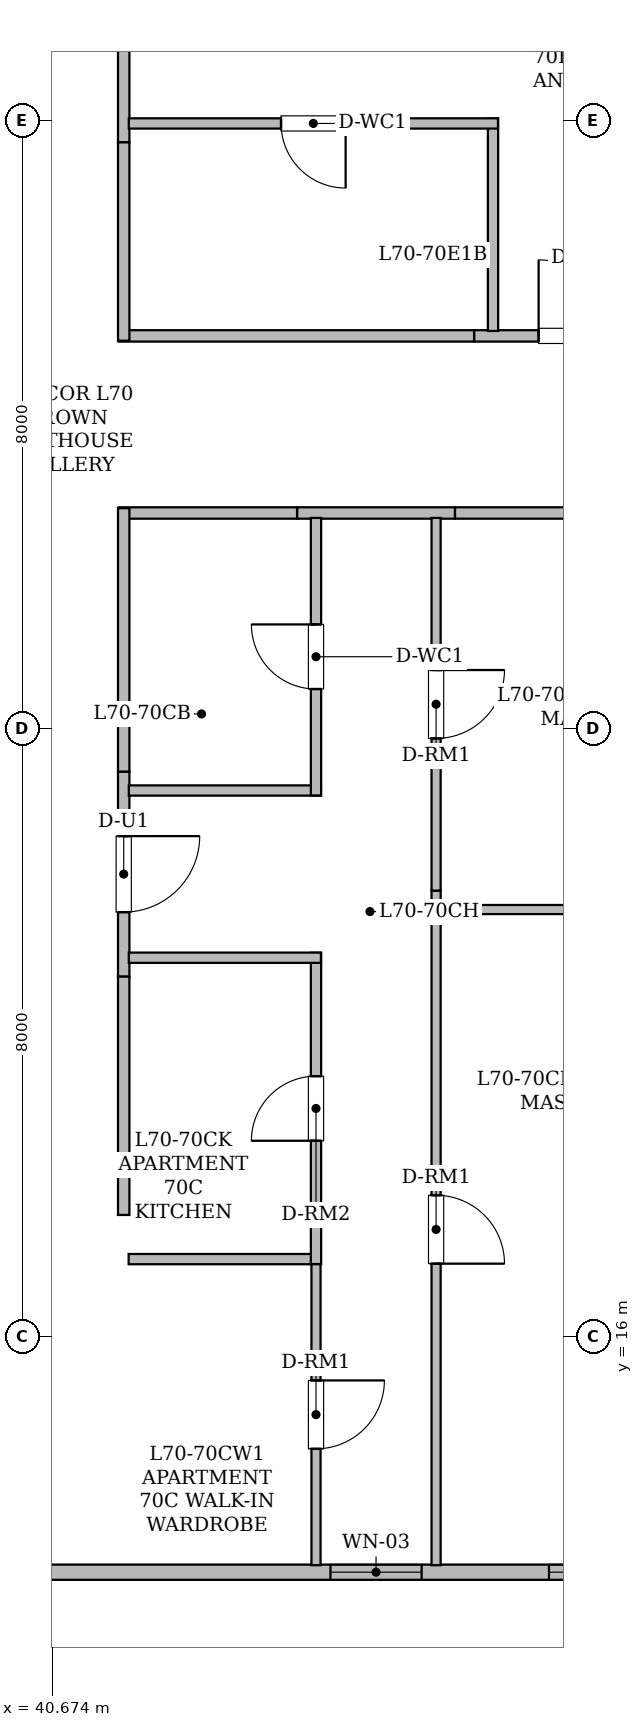
"""IFC4 building model, lengths in metres.
Left out: names, types, materials, properties, quantities, classifications, styles, units other than length and angle.
Written with IfcOpenShell. Run it as: python <this file> out.ifc"""

import sys

from ifc_helpers import new_model, si_unit, direction, frame, frame_2d, origin, place, context, subcontext, project, spatial, rectangle, extrude, element, fill, save


model = new_model("IFC4")
c1 = context("Model", 3, precision=1e-05, world=origin(), true_north=direction((0.0, 1.0)))
c2 = subcontext(c1, "Body", "Model", "MODEL_VIEW")
j1 = project(units=[si_unit("LENGTHUNIT", "METRE"), si_unit("PLANEANGLEUNIT", "RADIAN")], contexts=[c1])
p1 = place(None, origin())
s1 = spatial("IfcSite", under=j1, at=p1, CompositionType="ELEMENT")
p2 = place(p1, origin())
s2 = spatial("IfcBuilding", under=s1, at=p2, CompositionType="ELEMENT")
p3 = place(p2, frame((0.0, 0.0, 273.65)))
s3 = spatial("IfcBuildingStorey", under=s2, at=p3, CompositionType="ELEMENT", Elevation=273.65)
p4 = place(p3, frame((64.296, 12.9, 0.0), z_axis=(0.0, 0.0, 1.0), x_axis=(-1.0, 0.0, 0.0)))
e1 = element("IfcWall", 1, at=p4, inside=s3, PredefinedType="STANDARD", context=c2, shape_type="SweptSolid", body=[
    extrude(rectangle(XDim=38.593, YDim=0.2, at=frame_2d((19.296, 0.0))), origin(), (0.0, 0.0, 1.0), 3.78),
])
p5 = place(p4, frame((29.086, 0.0, 0.85)))
e2 = element("IfcOpeningElement", 2, at=p5, cuts=e1, PredefinedType="OPENING", context=c2, shape_type="SweptSolid", body=[
    extrude(rectangle(XDim=1.8, YDim=0.92, at=frame_2d((0.9, 0.46))), frame((0.0, 0.11, 0.0), z_axis=(0.0, -1.0, 0.0), x_axis=(1.0, 0.0, 0.0)), (0.0, 0.0, 1.0), 0.22),
])
p6 = place(p4, frame((18.761, 0.0, 0.78)))
e3 = element("IfcOpeningElement", 3, at=p6, cuts=e1, PredefinedType="OPENING", context=c2, shape_type="SweptSolid", body=[
    extrude(rectangle(XDim=1.2, YDim=1.5, at=frame_2d((0.6, 0.75))), frame((0.0, 0.11, 0.0), z_axis=(0.0, -1.0, 0.0), x_axis=(1.0, 0.0, 0.0)), (0.0, 0.0, 1.0), 0.22),
])
p7 = place(p4, frame((15.286, 0.0, 0.85)))
e4 = element("IfcOpeningElement", 4, at=p7, cuts=e1, PredefinedType="OPENING", context=c2, shape_type="SweptSolid", body=[
    extrude(rectangle(XDim=1.8, YDim=0.92, at=frame_2d((0.9, 0.46))), frame((0.0, 0.11, 0.0), z_axis=(0.0, -1.0, 0.0), x_axis=(1.0, 0.0, 0.0)), (0.0, 0.0, 1.0), 0.22),
])
p8 = place(p4, frame((8.921, 0.0, 0.85)))
e5 = element("IfcOpeningElement", 5, at=p8, cuts=e1, PredefinedType="OPENING", context=c2, shape_type="SweptSolid", body=[
    extrude(rectangle(XDim=1.8, YDim=0.92, at=frame_2d((0.9, 0.46))), frame((0.0, 0.11, 0.0), z_axis=(0.0, -1.0, 0.0), x_axis=(1.0, 0.0, 0.0)), (0.0, 0.0, 1.0), 0.22),
])
p9 = place(p4, frame((1.633, 0.0, 0.85)))
e6 = element("IfcOpeningElement", 6, at=p9, cuts=e1, PredefinedType="OPENING", context=c2, shape_type="SweptSolid", body=[
    extrude(rectangle(XDim=1.8, YDim=0.92, at=frame_2d((0.9, 0.46))), frame((0.0, 0.11, 0.0), z_axis=(0.0, -1.0, 0.0), x_axis=(1.0, 0.0, 0.0)), (0.0, 0.0, 1.0), 0.22),
])
p10 = place(p3, frame((45.974, 26.835, 0.0), z_axis=(0.0, 0.0, 1.0), x_axis=(-1.0, 0.0, 0.0)))
e7 = element("IfcWall", 7, at=p10, inside=s3, PredefinedType="STANDARD", context=c2, shape_type="SweptSolid", body=[
    extrude(rectangle(XDim=2.078, YDim=0.15, at=frame_2d((1.039, 0.0))), origin(), (0.0, 0.0, 1.0), 3.78),
])
p11 = place(p3, frame((41.615, 23.433, 0.0), z_axis=(0.0, 0.0, 1.0), x_axis=(0.0, -1.0, 0.0)))
e8 = element("IfcWall", 8, at=p11, inside=s3, PredefinedType="STANDARD", context=c2, shape_type="SweptSolid", body=[
    extrude(rectangle(XDim=2.698, YDim=0.15, at=frame_2d((1.349, 0.0))), origin(), (0.0, 0.0, 1.0), 2.22),
])
p12 = place(p11, frame((0.849, 0.0, 0.0)))
e9 = element("IfcOpeningElement", 9, at=p12, cuts=e8, PredefinedType="OPENING", context=c2, shape_type="SweptSolid", body=[
    extrude(rectangle(XDim=1.0, YDim=2.15, at=frame_2d((0.5, 1.075))), frame((0.0, 0.085, 0.0), z_axis=(0.0, -1.0, 0.0), x_axis=(1.0, 0.0, 0.0)), (0.0, 0.0, 1.0), 0.17),
])
p13 = place(p3, frame((43.896, 26.835, 0.0), z_axis=(0.0, 0.0, 1.0), x_axis=(-1.0, 0.0, 0.0)))
e10 = element("IfcWall", 10, at=p13, inside=s3, PredefinedType="STANDARD", context=c2, shape_type="SweptSolid", body=[
    extrude(rectangle(XDim=2.346, YDim=0.15, at=frame_2d((1.173, 0.0))), origin(), (0.0, 0.0, 1.0), 3.78),
])
p14 = place(p3, frame((41.615, 26.898, 0.0), z_axis=(0.0, 0.0, 1.0), x_axis=(0.0, -1.0, 0.0)))
e11 = element("IfcWall", 11, at=p14, inside=s3, PredefinedType="STANDARD", context=c2, shape_type="SweptSolid", body=[
    extrude(rectangle(XDim=3.465, YDim=0.15, at=frame_2d((1.732, 0.0))), origin(), (0.0, 0.0, 1.0), 2.22),
])
p15 = place(p3, frame((41.615, 20.735, 0.0), z_axis=(0.0, 0.0, 1.0), x_axis=(0.0, -1.0, 0.0)))
e12 = element("IfcWall", 12, at=p15, inside=s3, PredefinedType="STANDARD", context=c2, shape_type="SweptSolid", body=[
    extrude(rectangle(XDim=3.135, YDim=0.15, at=frame_2d((1.567, 0.0))), origin(), (0.0, 0.0, 1.0), 2.22),
])
p16 = place(p3, frame((50.744, 26.835, 0.0), z_axis=(0.0, 0.0, 1.0), x_axis=(-1.0, 0.0, 0.0)))
e13 = element("IfcWall", 13, at=p16, inside=s3, PredefinedType="STANDARD", context=c2, shape_type="SweptSolid", body=[
    extrude(rectangle(XDim=4.77, YDim=0.15, at=frame_2d((2.385, 0.0))), origin(), (0.0, 0.0, 1.0), 2.22),
])
p17 = place(p3, frame((46.225, 29.165, 0.0), z_axis=(0.0, 0.0, 1.0), x_axis=(1.0, 0.0, 0.0)))
e14 = element("IfcWall", 14, at=p17, inside=s3, PredefinedType="STANDARD", context=c2, shape_type="SweptSolid", body=[
    extrude(rectangle(XDim=2.698, YDim=0.15, at=frame_2d((1.349, 0.0))), origin(), (0.0, 0.0, 1.0), 3.78),
])
p18 = place(p17, frame((0.849, 0.0, 0.0)))
e15 = element("IfcOpeningElement", 15, at=p18, cuts=e14, PredefinedType="OPENING", context=c2, shape_type="SweptSolid", body=[
    extrude(rectangle(XDim=1.0, YDim=2.15, at=frame_2d((0.5, 1.075))), frame((0.0, 0.085, 0.0), z_axis=(0.0, -1.0, 0.0), x_axis=(1.0, 0.0, 0.0)), (0.0, 0.0, 1.0), 0.17),
])
p19 = place(p3, frame((41.615, 33.789, 0.0), z_axis=(0.0, 0.0, 1.0), x_axis=(0.0, -1.0, 0.0)))
e16 = element("IfcWall", 16, at=p19, inside=s3, PredefinedType="STANDARD", context=c2, shape_type="SweptSolid", body=[
    extrude(rectangle(XDim=2.078, YDim=0.15, at=frame_2d((1.039, 0.0))), origin(), (0.0, 0.0, 1.0), 3.78),
])
p20 = place(p3, frame((41.55, 29.165, 0.0), z_axis=(0.0, 0.0, 1.0), x_axis=(1.0, 0.0, 0.0)))
e17 = element("IfcWall", 17, at=p20, inside=s3, PredefinedType="STANDARD", context=c2, shape_type="SweptSolid", body=[
    extrude(rectangle(XDim=4.675, YDim=0.15, at=frame_2d((2.337, 0.0))), origin(), (0.0, 0.0, 1.0), 3.78),
])
p21 = place(p3, frame((41.615, 31.711, 0.0), z_axis=(0.0, 0.0, 1.0), x_axis=(0.0, -1.0, 0.0)))
e18 = element("IfcWall", 18, at=p21, inside=s3, PredefinedType="STANDARD", context=c2, shape_type="SweptSolid", body=[
    extrude(rectangle(XDim=2.609, YDim=0.15, at=frame_2d((1.304, 0.0))), origin(), (0.0, 0.0, 1.0), 3.78),
])
p22 = place(p3, frame((44.145, 16.954, 0.0), z_axis=(0.0, 0.0, 1.0), x_axis=(0.0, -1.0, 0.0)))
e19 = element("IfcWall", 19, at=p22, inside=s3, PredefinedType="PARTITIONING", context=c2, shape_type="SweptSolid", body=[
    extrude(rectangle(XDim=3.962, YDim=0.12, at=frame_2d((1.981, 0.0))), origin(), (0.0, 0.0, 1.0), 2.22),
])
p23 = place(p22, frame((1.531, 0.0, 0.0)))
e20 = element("IfcOpeningElement", 20, at=p23, cuts=e19, PredefinedType="OPENING", context=c2, shape_type="SweptSolid", body=[
    extrude(rectangle(XDim=0.9, YDim=2.1, at=frame_2d((0.45, 1.05))), frame((0.0, 0.07, 0.0), z_axis=(0.0, -1.0, 0.0), x_axis=(1.0, 0.0, 0.0)), (0.0, 0.0, 1.0), 0.14),
])
p24 = place(p3, frame((41.68, 17.019, 0.0), z_axis=(0.0, 0.0, 1.0), x_axis=(1.0, 0.0, 0.0)))
e21 = element("IfcWall", 21, at=p24, inside=s3, PredefinedType="PARTITIONING", context=c2, shape_type="SweptSolid", body=[
    extrude(rectangle(XDim=2.4, YDim=0.135, at=frame_2d((1.2, 0.0))), origin(), (0.0, 0.0, 1.0), 3.78),
])
p25 = place(p3, frame((41.682, 23.184, 0.0), z_axis=(0.0, 0.0, 1.0), x_axis=(1.0, 0.0, 0.0)))
e22 = element("IfcWall", 22, at=p25, inside=s3, PredefinedType="PARTITIONING", context=c2, shape_type="SweptSolid", body=[
    extrude(rectangle(XDim=2.528, YDim=0.135, at=frame_2d((1.264, 0.0))), origin(), (0.0, 0.0, 1.0), 2.22),
])
p26 = place(p3, frame((44.145, 23.119, 0.0), z_axis=(0.0, 0.0, 1.0), x_axis=(0.0, 1.0, 0.0)))
e23 = element("IfcWall", 23, at=p26, inside=s3, PredefinedType="PARTITIONING", context=c2, shape_type="SweptSolid", body=[
    extrude(rectangle(XDim=3.651, YDim=0.135, at=frame_2d((1.826, 0.0))), origin(), (0.0, 0.0, 1.0), 2.22),
])
p27 = place(p26, frame((1.4, 0.0, 0.0)))
e24 = element("IfcOpeningElement", 24, at=p27, cuts=e23, PredefinedType="OPENING", context=c2, shape_type="SweptSolid", body=[
    extrude(rectangle(XDim=0.85, YDim=2.1, at=frame_2d((0.425, 1.05))), frame((0.0, 0.077, 0.0), z_axis=(0.0, -1.0, 0.0), x_axis=(1.0, 0.0, 0.0)), (0.0, 0.0, 1.0), 0.155),
])
p28 = place(p3, frame((44.145, 16.954, 0.0), z_axis=(0.0, 0.0, 1.0), x_axis=(0.0, 1.0, 0.0)))
e25 = element("IfcWall", 25, at=p28, inside=s3, PredefinedType="PARTITIONING", context=c2, shape_type="SweptSolid", body=[
    extrude(rectangle(XDim=4.095, YDim=0.135, at=frame_2d((2.047, 0.0))), origin(), (0.0, 0.0, 1.0), 2.22),
])
p29 = place(p28, frame((1.622, 0.0, 0.0)))
e26 = element("IfcOpeningElement", 26, at=p29, cuts=e25, PredefinedType="OPENING", context=c2, shape_type="SweptSolid", body=[
    extrude(rectangle(XDim=0.85, YDim=2.1, at=frame_2d((0.425, 1.05))), frame((0.0, 0.077, 0.0), z_axis=(0.0, -1.0, 0.0), x_axis=(1.0, 0.0, 0.0)), (0.0, 0.0, 1.0), 0.155),
])
p30 = place(p3, frame((44.21, 20.984, 0.0), z_axis=(0.0, 0.0, 1.0), x_axis=(-1.0, 0.0, 0.0)))
e27 = element("IfcWall", 27, at=p30, inside=s3, PredefinedType="PARTITIONING", context=c2, shape_type="SweptSolid", body=[
    extrude(rectangle(XDim=2.528, YDim=0.135, at=frame_2d((1.264, 0.0))), origin(), (0.0, 0.0, 1.0), 3.78),
])
p31 = place(p3, frame((45.725, 21.867, 0.0), z_axis=(0.0, 0.0, 1.0), x_axis=(0.0, -1.0, 0.0)))
e28 = element("IfcWall", 28, at=p31, inside=s3, PredefinedType="PARTITIONING", context=c2, shape_type="SweptSolid", body=[
    extrude(rectangle(XDim=8.875, YDim=0.12, at=frame_2d((4.438, 0.0))), origin(), (0.0, 0.0, 1.0), 2.22),
])
p32 = place(p31, frame((4.008, 0.0, 0.0)))
e29 = element("IfcOpeningElement", 29, at=p32, cuts=e28, PredefinedType="OPENING", context=c2, shape_type="SweptSolid", body=[
    extrude(rectangle(XDim=0.9, YDim=2.1, at=frame_2d((0.45, 1.05))), frame((0.0, 0.07, 0.0), z_axis=(0.0, -1.0, 0.0), x_axis=(1.0, 0.0, 0.0)), (0.0, 0.0, 1.0), 0.14),
])
p33 = place(p3, frame((45.725, 26.77, 0.0), z_axis=(0.0, 0.0, 1.0), x_axis=(0.0, -1.0, 0.0)))
e30 = element("IfcWall", 30, at=p33, inside=s3, PredefinedType="PARTITIONING", context=c2, shape_type="SweptSolid", body=[
    extrude(rectangle(XDim=4.903, YDim=0.12, at=frame_2d((2.452, 0.0))), origin(), (0.0, 0.0, 1.0), 2.22),
])
p34 = place(p33, frame((2.001, 0.0, 0.0)))
e31 = element("IfcOpeningElement", 31, at=p34, cuts=e30, PredefinedType="OPENING", context=c2, shape_type="SweptSolid", body=[
    extrude(rectangle(XDim=0.9, YDim=2.1, at=frame_2d((0.45, 1.05))), frame((0.0, 0.07, 0.0), z_axis=(0.0, -1.0, 0.0), x_axis=(1.0, 0.0, 0.0)), (0.0, 0.0, 1.0), 0.14),
])
p35 = place(p3, frame((45.779, 21.618, 0.0), z_axis=(0.0, 0.0, 1.0), x_axis=(1.0, 0.0, 0.0)))
e32 = element("IfcWall", 32, at=p35, inside=s3, PredefinedType="PARTITIONING", context=c2, shape_type="SweptSolid", body=[
    extrude(rectangle(XDim=4.651, YDim=0.12, at=frame_2d((2.325, 0.0))), origin(), (0.0, 0.0, 1.0), 2.22),
])
p36 = place(p3, frame((46.474, 29.23, 0.0), z_axis=(0.0, 0.0, 1.0), x_axis=(0.0, 1.0, 0.0)))
e33 = element("IfcWall", 33, at=p36, inside=s3, PredefinedType="PARTITIONING", context=c2, shape_type="SweptSolid", body=[
    extrude(rectangle(XDim=2.795, YDim=0.135, at=frame_2d((1.397, 0.0))), origin(), (0.0, 0.0, 1.0), 3.78),
])
p37 = place(p3, frame((46.539, 31.96, 0.0), z_axis=(0.0, 0.0, 1.0), x_axis=(-1.0, 0.0, 0.0)))
e34 = element("IfcWall", 34, at=p37, inside=s3, PredefinedType="PARTITIONING", context=c2, shape_type="SweptSolid", body=[
    extrude(rectangle(XDim=4.857, YDim=0.135, at=frame_2d((2.429, 0.0))), origin(), (0.0, 0.0, 1.0), 3.78),
])
p38 = place(p37, frame((2.004, 0.0, 0.0)))
e35 = element("IfcOpeningElement", 35, at=p38, cuts=e34, PredefinedType="OPENING", context=c2, shape_type="SweptSolid", body=[
    extrude(rectangle(XDim=0.85, YDim=2.1, at=frame_2d((0.425, 1.05))), frame((0.0, 0.077, 0.0), z_axis=(0.0, -1.0, 0.0), x_axis=(1.0, 0.0, 0.0)), (0.0, 0.0, 1.0), 0.155),
])
p39 = place(p6, origin())
e36 = element("IfcWindow", 36, at=p39, inside=s3, PartitioningType="SINGLE_PANEL", PredefinedType="WINDOW", context=c2, shape_type="SweptSolid", body=[
    extrude(rectangle(XDim=1.2, YDim=1.5, at=frame_2d((0.6, 0.75))), frame((0.0, 0.03, 0.0), z_axis=(0.0, -1.0, 0.0), x_axis=(1.0, 0.0, 0.0)), (0.0, 0.0, 1.0), 0.06),
])
fill(e3, e36)
p40 = place(p7, origin())
e37 = element("IfcWindow", 37, at=p40, inside=s3, PartitioningType="SINGLE_PANEL", PredefinedType="WINDOW", context=c2, shape_type="SweptSolid", body=[
    extrude(rectangle(XDim=1.8, YDim=0.92, at=frame_2d((0.9, 0.46))), frame((0.0, 0.03, 0.0), z_axis=(0.0, -1.0, 0.0), x_axis=(1.0, 0.0, 0.0)), (0.0, 0.0, 1.0), 0.06),
])
fill(e4, e37)
p41 = place(p12, origin())
e38 = element("IfcDoor", 38, at=p41, inside=s3, OperationType="SINGLE_SWING_LEFT", PredefinedType="DOOR", context=c2, shape_type="SweptSolid", body=[
    extrude(rectangle(XDim=1.0, YDim=2.15, at=frame_2d((0.5, 1.075))), frame((0.0, 0.025, 0.0), z_axis=(0.0, -1.0, 0.0), x_axis=(1.0, 0.0, 0.0)), (0.0, 0.0, 1.0), 0.05),
])
fill(e9, e38)
p42 = place(p18, origin())
e39 = element("IfcDoor", 39, at=p42, inside=s3, OperationType="SINGLE_SWING_LEFT", PredefinedType="DOOR", context=c2, shape_type="SweptSolid", body=[
    extrude(rectangle(XDim=1.0, YDim=2.15, at=frame_2d((0.5, 1.075))), frame((0.0, 0.025, 0.0), z_axis=(0.0, -1.0, 0.0), x_axis=(1.0, 0.0, 0.0)), (0.0, 0.0, 1.0), 0.05),
])
fill(e15, e39)
p43 = place(p23, origin())
e40 = element("IfcDoor", 40, at=p43, inside=s3, OperationType="SINGLE_SWING_LEFT", PredefinedType="DOOR", context=c2, shape_type="SweptSolid", body=[
    extrude(rectangle(XDim=0.9, YDim=2.1, at=frame_2d((0.45, 1.05))), frame((0.0, 0.025, 0.0), z_axis=(0.0, -1.0, 0.0), x_axis=(1.0, 0.0, 0.0)), (0.0, 0.0, 1.0), 0.05),
])
fill(e20, e40)
p44 = place(p27, origin())
e41 = element("IfcDoor", 41, at=p44, inside=s3, OperationType="SINGLE_SWING_RIGHT", PredefinedType="DOOR", context=c2, shape_type="SweptSolid", body=[
    extrude(rectangle(XDim=0.85, YDim=2.1, at=frame_2d((0.425, 1.05))), frame((0.0, 0.025, 0.0), z_axis=(0.0, -1.0, 0.0), x_axis=(1.0, 0.0, 0.0)), (0.0, 0.0, 1.0), 0.05),
])
fill(e24, e41)
p45 = place(p29, origin())
e42 = element("IfcDoor", 42, at=p45, inside=s3, OperationType="SINGLE_SWING_LEFT", PredefinedType="DOOR", context=c2, shape_type="SweptSolid", body=[
    extrude(rectangle(XDim=0.85, YDim=2.1, at=frame_2d((0.425, 1.05))), frame((0.0, 0.025, 0.0), z_axis=(0.0, -1.0, 0.0), x_axis=(1.0, 0.0, 0.0)), (0.0, 0.0, 1.0), 0.05),
])
fill(e26, e42)
p46 = place(p32, origin())
e43 = element("IfcDoor", 43, at=p46, inside=s3, OperationType="SINGLE_SWING_RIGHT", PredefinedType="DOOR", context=c2, shape_type="SweptSolid", body=[
    extrude(rectangle(XDim=0.9, YDim=2.1, at=frame_2d((0.45, 1.05))), frame((0.0, 0.025, 0.0), z_axis=(0.0, -1.0, 0.0), x_axis=(1.0, 0.0, 0.0)), (0.0, 0.0, 1.0), 0.05),
])
fill(e29, e43)
p47 = place(p34, origin())
e44 = element("IfcDoor", 44, at=p47, inside=s3, OperationType="SINGLE_SWING_LEFT", PredefinedType="DOOR", context=c2, shape_type="SweptSolid", body=[
    extrude(rectangle(XDim=0.9, YDim=2.1, at=frame_2d((0.45, 1.05))), frame((0.0, 0.025, 0.0), z_axis=(0.0, -1.0, 0.0), x_axis=(1.0, 0.0, 0.0)), (0.0, 0.0, 1.0), 0.05),
])
fill(e31, e44)
p48 = place(p38, origin())
e45 = element("IfcDoor", 45, at=p48, inside=s3, OperationType="SINGLE_SWING_LEFT", PredefinedType="DOOR", context=c2, shape_type="SweptSolid", body=[
    extrude(rectangle(XDim=0.85, YDim=2.1, at=frame_2d((0.425, 1.05))), frame((0.0, 0.025, 0.0), z_axis=(0.0, -1.0, 0.0), x_axis=(1.0, 0.0, 0.0)), (0.0, 0.0, 1.0), 0.05),
])
fill(e35, e45)
save(model, sys.argv[1])
